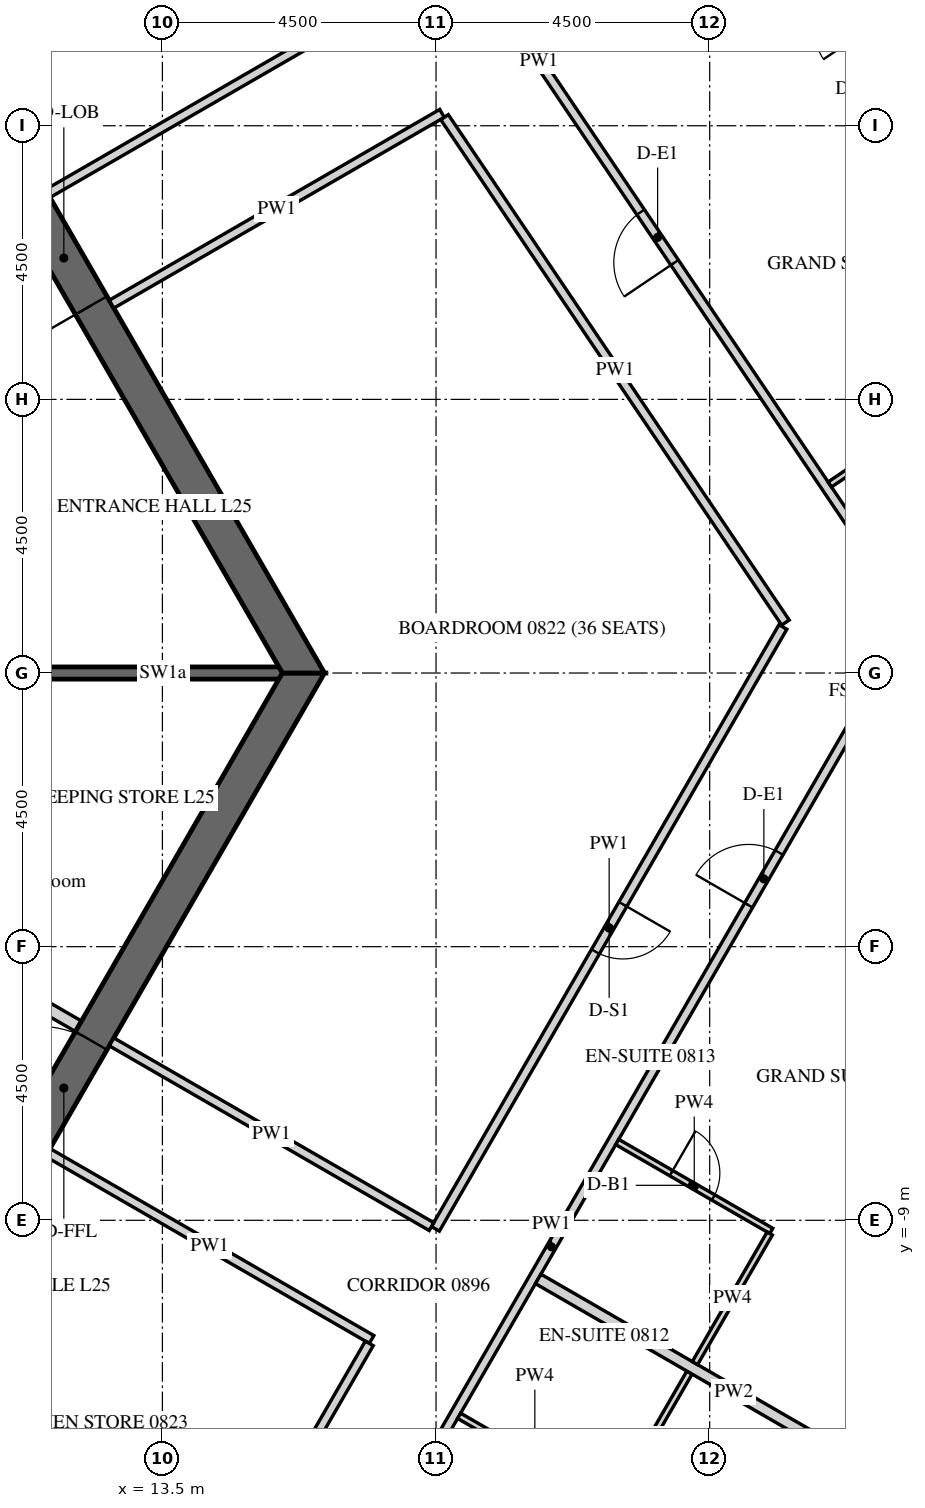
"""IFC4 building model, lengths in metres.
Left out: names, types, materials, properties, quantities, classifications, styles, units other than length and angle.
Written with IfcOpenShell. Run it as: python <this file> out.ifc"""

import sys

from ifc_helpers import new_model, si_unit, direction, frame, frame_2d, origin, place, context, subcontext, project, spatial, polyline, rectangle, outline, extrude, element, fill, save


model = new_model("IFC4")
c1 = context("Model", 3, precision=1e-05, world=origin(), true_north=direction((0.0, 1.0)))
c2 = subcontext(c1, "Body", "Model", "MODEL_VIEW")
j1 = project(units=[si_unit("LENGTHUNIT", "METRE"), si_unit("PLANEANGLEUNIT", "RADIAN")], contexts=[c1])
p1 = place(None, origin())
s1 = spatial("IfcSite", under=j1, at=p1, CompositionType="ELEMENT")
p2 = place(p1, origin())
s2 = spatial("IfcBuilding", under=s1, at=p2, CompositionType="ELEMENT")
p3 = place(p2, frame((0.0, 0.0, 111.6)))
s3 = spatial("IfcBuildingStorey", under=s2, at=p3, CompositionType="ELEMENT", Elevation=111.6)
p4 = place(p3, frame((18.83, -26.835, -0.15), z_axis=(0.0, 0.0, 1.0), x_axis=(0.500003800416, 0.866023209602, 0.0)))
e1 = element("IfcWall", 1, at=p4, inside=s3, PredefinedType="SOLIDWALL", context=c2, shape_type="SweptSolid", body=[
    extrude(outline(polyline([(-0.022, -0.275), (30.097, -0.275), (30.045, 0.275), (0.022, 0.275), (-0.022, -0.275)])), origin(), (0.0, 0.0, 1.0), 3.9),
])
p5 = place(p4, frame((1.236, 0.0, 1.05)))
e2 = element("IfcOpeningElement", 2, at=p5, cuts=e1, PredefinedType="OPENING", context=c2, shape_type="SweptSolid", body=[
    extrude(rectangle(XDim=2.4, YDim=2.4, at=frame_2d((1.2, 1.2))), frame((0.0, 0.285, 0.0), z_axis=(0.0, -1.0, 0.0), x_axis=(1.0, 0.0, 0.0)), (0.0, 0.0, 1.0), 0.57),
])
p6 = place(p4, frame((4.835, 0.0, 1.05)))
e3 = element("IfcOpeningElement", 3, at=p6, cuts=e1, PredefinedType="OPENING", context=c2, shape_type="SweptSolid", body=[
    extrude(rectangle(XDim=2.4, YDim=2.4, at=frame_2d((1.2, 1.2))), frame((0.0, 0.285, 0.0), z_axis=(0.0, -1.0, 0.0), x_axis=(1.0, 0.0, 0.0)), (0.0, 0.0, 1.0), 0.57),
])
p7 = place(p4, frame((8.436, 0.0, 1.05)))
e4 = element("IfcOpeningElement", 4, at=p7, cuts=e1, PredefinedType="OPENING", context=c2, shape_type="SweptSolid", body=[
    extrude(rectangle(XDim=2.4, YDim=2.4, at=frame_2d((1.2, 1.2))), frame((0.0, 0.285, 0.0), z_axis=(0.0, -1.0, 0.0), x_axis=(1.0, 0.0, 0.0)), (0.0, 0.0, 1.0), 0.57),
])
p8 = place(p4, frame((12.035, 0.0, 1.05)))
e5 = element("IfcOpeningElement", 5, at=p8, cuts=e1, PredefinedType="OPENING", context=c2, shape_type="SweptSolid", body=[
    extrude(rectangle(XDim=2.4, YDim=2.4, at=frame_2d((1.2, 1.2))), frame((0.0, 0.285, 0.0), z_axis=(0.0, -1.0, 0.0), x_axis=(1.0, 0.0, 0.0)), (0.0, 0.0, 1.0), 0.57),
])
p9 = place(p4, frame((15.635, 0.0, 1.05)))
e6 = element("IfcOpeningElement", 6, at=p9, cuts=e1, PredefinedType="OPENING", context=c2, shape_type="SweptSolid", body=[
    extrude(rectangle(XDim=2.4, YDim=2.4, at=frame_2d((1.2, 1.2))), frame((0.0, 0.285, 0.0), z_axis=(0.0, -1.0, 0.0), x_axis=(1.0, 0.0, 0.0)), (0.0, 0.0, 1.0), 0.57),
])
p10 = place(p4, frame((19.236, 0.0, 1.05)))
e7 = element("IfcOpeningElement", 7, at=p10, cuts=e1, PredefinedType="OPENING", context=c2, shape_type="SweptSolid", body=[
    extrude(rectangle(XDim=2.4, YDim=2.4, at=frame_2d((1.2, 1.2))), frame((0.0, 0.285, 0.0), z_axis=(0.0, -1.0, 0.0), x_axis=(1.0, 0.0, 0.0)), (0.0, 0.0, 1.0), 0.57),
])
p11 = place(p4, frame((22.835, 0.0, 1.05)))
e8 = element("IfcOpeningElement", 8, at=p11, cuts=e1, PredefinedType="OPENING", context=c2, shape_type="SweptSolid", body=[
    extrude(rectangle(XDim=2.4, YDim=2.4, at=frame_2d((1.2, 1.2))), frame((0.0, 0.285, 0.0), z_axis=(0.0, -1.0, 0.0), x_axis=(1.0, 0.0, 0.0)), (0.0, 0.0, 1.0), 0.57),
])
p12 = place(p4, frame((26.436, 0.0, 1.05)))
e9 = element("IfcOpeningElement", 9, at=p12, cuts=e1, PredefinedType="OPENING", context=c2, shape_type="SweptSolid", body=[
    extrude(rectangle(XDim=2.4, YDim=2.4, at=frame_2d((1.2, 1.2))), frame((0.0, 0.285, 0.0), z_axis=(0.0, -1.0, 0.0), x_axis=(1.0, 0.0, 0.0)), (0.0, 0.0, 1.0), 0.57),
])
p13 = place(p3, frame((33.728, 3.153, -0.15), z_axis=(0.0, 0.0, 1.0), x_axis=(-0.559192411416, 0.82903790445, 0.0)))
e10 = element("IfcWall", 10, at=p13, inside=s3, PredefinedType="SOLIDWALL", context=c2, shape_type="SweptSolid", body=[
    extrude(outline(polyline([(-0.026, -0.275), (30.093, -0.275), (30.048, 0.275), (0.026, 0.275), (-0.026, -0.275)])), origin(), (0.0, 0.0, 1.0), 3.9),
])
p14 = place(p13, frame((1.236, 0.0, 1.05)))
e11 = element("IfcOpeningElement", 11, at=p14, cuts=e10, PredefinedType="OPENING", context=c2, shape_type="SweptSolid", body=[
    extrude(rectangle(XDim=2.4, YDim=2.4, at=frame_2d((1.2, 1.2))), frame((0.0, 0.285, 0.0), z_axis=(0.0, -1.0, 0.0), x_axis=(1.0, 0.0, 0.0)), (0.0, 0.0, 1.0), 0.57),
])
p15 = place(p13, frame((4.835, 0.0, 1.05)))
e12 = element("IfcOpeningElement", 12, at=p15, cuts=e10, PredefinedType="OPENING", context=c2, shape_type="SweptSolid", body=[
    extrude(rectangle(XDim=2.4, YDim=2.4, at=frame_2d((1.2, 1.2))), frame((0.0, 0.285, 0.0), z_axis=(0.0, -1.0, 0.0), x_axis=(1.0, 0.0, 0.0)), (0.0, 0.0, 1.0), 0.57),
])
p16 = place(p13, frame((8.436, 0.0, 1.05)))
e13 = element("IfcOpeningElement", 13, at=p16, cuts=e10, PredefinedType="OPENING", context=c2, shape_type="SweptSolid", body=[
    extrude(rectangle(XDim=2.4, YDim=2.4, at=frame_2d((1.2, 1.2))), frame((0.0, 0.285, 0.0), z_axis=(0.0, -1.0, 0.0), x_axis=(1.0, 0.0, 0.0)), (0.0, 0.0, 1.0), 0.57),
])
p17 = place(p13, frame((12.035, 0.0, 1.05)))
e14 = element("IfcOpeningElement", 14, at=p17, cuts=e10, PredefinedType="OPENING", context=c2, shape_type="SweptSolid", body=[
    extrude(rectangle(XDim=2.4, YDim=2.4, at=frame_2d((1.2, 1.2))), frame((0.0, 0.285, 0.0), z_axis=(0.0, -1.0, 0.0), x_axis=(1.0, 0.0, 0.0)), (0.0, 0.0, 1.0), 0.57),
])
p18 = place(p13, frame((15.635, 0.0, 1.05)))
e15 = element("IfcOpeningElement", 15, at=p18, cuts=e10, PredefinedType="OPENING", context=c2, shape_type="SweptSolid", body=[
    extrude(rectangle(XDim=2.4, YDim=2.4, at=frame_2d((1.2, 1.2))), frame((0.0, 0.285, 0.0), z_axis=(0.0, -1.0, 0.0), x_axis=(1.0, 0.0, 0.0)), (0.0, 0.0, 1.0), 0.57),
])
p19 = place(p13, frame((19.236, 0.0, 1.05)))
e16 = element("IfcOpeningElement", 16, at=p19, cuts=e10, PredefinedType="OPENING", context=c2, shape_type="SweptSolid", body=[
    extrude(rectangle(XDim=2.4, YDim=2.4, at=frame_2d((1.2, 1.2))), frame((0.0, 0.285, 0.0), z_axis=(0.0, -1.0, 0.0), x_axis=(1.0, 0.0, 0.0)), (0.0, 0.0, 1.0), 0.57),
])
p20 = place(p13, frame((22.835, 0.0, 1.05)))
e17 = element("IfcOpeningElement", 17, at=p20, cuts=e10, PredefinedType="OPENING", context=c2, shape_type="SweptSolid", body=[
    extrude(rectangle(XDim=2.4, YDim=2.4, at=frame_2d((1.2, 1.2))), frame((0.0, 0.285, 0.0), z_axis=(0.0, -1.0, 0.0), x_axis=(1.0, 0.0, 0.0)), (0.0, 0.0, 1.0), 0.57),
])
p21 = place(p13, frame((26.436, 0.0, 1.05)))
e18 = element("IfcOpeningElement", 18, at=p21, cuts=e10, PredefinedType="OPENING", context=c2, shape_type="SweptSolid", body=[
    extrude(rectangle(XDim=2.4, YDim=2.4, at=frame_2d((1.2, 1.2))), frame((0.0, 0.285, 0.0), z_axis=(0.0, -1.0, 0.0), x_axis=(1.0, 0.0, 0.0)), (0.0, 0.0, 1.0), 0.57),
])
p22 = place(p3, frame((7.91, -13.7, -0.15), z_axis=(0.0, 0.0, 1.0), x_axis=(0.499999880136, 0.866025472988, 0.0)))
e19 = element("IfcWall", 19, at=p22, inside=s3, PredefinedType="SHEAR", context=c2, shape_type="SweptSolid", body=[
    extrude(outline(polyline([(-0.173, -0.3), (15.993, -0.3), (15.646, 0.3), (0.173, 0.3), (-0.173, -0.3)])), origin(), (0.0, 0.0, 1.0), 3.9),
])
p23 = place(p22, frame((7.039, 0.0, 0.15)))
e20 = element("IfcOpeningElement", 20, at=p23, cuts=e19, PredefinedType="OPENING", context=c2, shape_type="SweptSolid", body=[
    extrude(rectangle(XDim=1.8, YDim=2.4, at=frame_2d((0.9, 1.2))), frame((0.0, 0.31, 0.0), z_axis=(0.0, -1.0, 0.0), x_axis=(1.0, 0.0, 0.0)), (0.0, 0.0, 1.0), 0.62),
])
p24 = place(p3, frame((15.819, 0.0, -0.15), z_axis=(0.0, 0.0, 1.0), x_axis=(-0.499999880136, 0.866025472988, 0.0)))
e21 = element("IfcWall", 21, at=p24, inside=s3, PredefinedType="SHEAR", context=c2, shape_type="SweptSolid", body=[
    extrude(outline(polyline([(-0.173, -0.3), (15.993, -0.3), (15.646, 0.3), (0.173, 0.3), (-0.173, -0.3)])), origin(), (0.0, 0.0, 1.0), 3.9),
])
p25 = place(p24, frame((6.981, 0.0, 0.15)))
e22 = element("IfcOpeningElement", 22, at=p25, cuts=e21, PredefinedType="OPENING", context=c2, shape_type="SweptSolid", body=[
    extrude(rectangle(XDim=1.8, YDim=2.4, at=frame_2d((0.9, 1.2))), frame((0.0, 0.31, 0.0), z_axis=(0.0, -1.0, 0.0), x_axis=(1.0, 0.0, 0.0)), (0.0, 0.0, 1.0), 0.62),
])
p26 = place(p3, frame((11.547, 0.0, -0.15), z_axis=(0.0, 0.0, 1.0), x_axis=(1.0, 0.0, 0.0)))
e23 = element("IfcWall", 23, at=p26, inside=s3, PredefinedType="SHEAR", context=c2, shape_type="SweptSolid", body=[
    extrude(rectangle(XDim=3.926, YDim=0.2, at=frame_2d((1.963, 0.0))), origin(), (0.0, 0.0, 1.0), 3.9),
])
p27 = place(p3, frame((9.175, -4.109, 0.0), z_axis=(0.0, 0.0, 1.0), x_axis=(0.865989465428, -0.500062241894, 0.0)))
e24 = element("IfcWall", 24, at=p27, inside=s3, PredefinedType="PARTITIONING", context=c2, shape_type="SweptSolid", body=[
    extrude(rectangle(XDim=3.4, YDim=0.2, at=frame_2d((1.7, 0.0))), origin(), (0.0, 0.0, 1.0), 3.65),
])
p28 = place(p27, frame((1.351, 0.0, 0.0)))
e25 = element("IfcOpeningElement", 25, at=p28, cuts=e24, PredefinedType="OPENING", context=c2, shape_type="SweptSolid", body=[
    extrude(rectangle(XDim=0.9, YDim=2.1, at=frame_2d((0.45, 1.05))), frame((0.0, 0.11, 0.0), z_axis=(0.0, -1.0, 0.0), x_axis=(1.0, 0.0, 0.0)), (0.0, 0.0, 1.0), 0.22),
])
p29 = place(p3, frame((13.928, -19.775, 0.0), z_axis=(0.0, 0.0, 1.0), x_axis=(0.50000450071, 0.866022805283, 0.0)))
e26 = element("IfcWall", 26, at=p29, inside=s3, PredefinedType="PARTITIONING", context=c2, shape_type="SweptSolid", body=[
    extrude(rectangle(XDim=23.877, YDim=0.15, at=frame_2d((11.938, 0.0))), origin(), (0.0, 0.0, 1.0), 2.988),
])
p30 = place(p29, frame((3.843, 0.0, 0.0)))
e27 = element("IfcOpeningElement", 27, at=p30, cuts=e26, PredefinedType="OPENING", context=c2, shape_type="SweptSolid", body=[
    extrude(rectangle(XDim=1.0, YDim=2.1, at=frame_2d((0.5, 1.05))), frame((0.0, 0.085, 0.0), z_axis=(0.0, -1.0, 0.0), x_axis=(1.0, 0.0, 0.0)), (0.0, 0.0, 1.0), 0.17),
])
p31 = place(p29, frame((18.425, 0.0, 0.0)))
e28 = element("IfcOpeningElement", 28, at=p31, cuts=e26, PredefinedType="OPENING", context=c2, shape_type="SweptSolid", body=[
    extrude(rectangle(XDim=1.0, YDim=2.1, at=frame_2d((0.5, 1.05))), frame((0.0, 0.085, 0.0), z_axis=(0.0, -1.0, 0.0), x_axis=(1.0, 0.0, 0.0)), (0.0, 0.0, 1.0), 0.17),
])
p32 = place(p3, frame((25.821, 0.972, 0.0), z_axis=(0.0, 0.0, 1.0), x_axis=(-0.559192946342, 0.829037543638, 0.0)))
e29 = element("IfcWall", 29, at=p32, inside=s3, PredefinedType="PARTITIONING", context=c2, shape_type="SweptSolid", body=[
    extrude(rectangle(XDim=21.918, YDim=0.15, at=frame_2d((10.959, 0.0))), origin(), (0.0, 0.0, 1.0), 2.988),
])
p33 = place(p32, frame((6.969, 0.0, 0.0)))
e30 = element("IfcOpeningElement", 30, at=p33, cuts=e29, PredefinedType="OPENING", context=c2, shape_type="SweptSolid", body=[
    extrude(rectangle(XDim=1.0, YDim=2.1, at=frame_2d((0.5, 1.05))), frame((0.0, 0.085, 0.0), z_axis=(0.0, -1.0, 0.0), x_axis=(1.0, 0.0, 0.0)), (0.0, 0.0, 1.0), 0.17),
])
p34 = place(p32, frame((15.511, 0.0, 0.0)))
e31 = element("IfcOpeningElement", 31, at=p34, cuts=e29, PredefinedType="OPENING", context=c2, shape_type="SweptSolid", body=[
    extrude(rectangle(XDim=1.0, YDim=2.1, at=frame_2d((0.5, 1.05))), frame((0.0, 0.085, 0.0), z_axis=(0.0, -1.0, 0.0), x_axis=(1.0, 0.0, 0.0)), (0.0, 0.0, 1.0), 0.17),
])
p35 = place(p3, frame((12.664, 6.066, 0.0), z_axis=(0.0, 0.0, 1.0), x_axis=(0.866036561919, 0.499980673046, 0.0)))
e32 = element("IfcWall", 32, at=p35, inside=s3, PredefinedType="PARTITIONING", context=c2, shape_type="SweptSolid", body=[
    extrude(rectangle(XDim=6.275, YDim=0.15, at=frame_2d((3.137, 0.0))), origin(), (0.0, 0.0, 1.0), 2.988),
])
p36 = place(p3, frame((18.14, 9.141, 0.0), z_axis=(0.0, 0.0, 1.0), x_axis=(0.55918799196, -0.829040885389, 0.0)))
e33 = element("IfcWall", 33, at=p36, inside=s3, PredefinedType="PARTITIONING", context=c2, shape_type="SweptSolid", body=[
    extrude(rectangle(XDim=10.025, YDim=0.15, at=frame_2d((5.013, 0.0))), origin(), (0.0, 0.0, 1.0), 2.988),
])
p37 = place(p3, frame((23.704, 0.757, 0.0), z_axis=(0.0, 0.0, 1.0), x_axis=(-0.500010297365, -0.866019458516, 0.0)))
e34 = element("IfcWall", 34, at=p37, inside=s3, PredefinedType="PARTITIONING", context=c2, shape_type="SweptSolid", body=[
    extrude(rectangle(XDim=11.429, YDim=0.15, at=frame_2d((5.714, 0.0))), origin(), (0.0, 0.0, 1.0), 2.988),
])
p38 = place(p37, frame((5.264, 0.0, 0.0)))
e35 = element("IfcOpeningElement", 35, at=p38, cuts=e34, PredefinedType="OPENING", context=c2, shape_type="SweptSolid", body=[
    extrude(rectangle(XDim=0.9, YDim=2.1, at=frame_2d((0.45, 1.05))), frame((0.0, 0.085, 0.0), z_axis=(0.0, -1.0, 0.0), x_axis=(1.0, 0.0, 0.0)), (0.0, 0.0, 1.0), 0.17),
])
p39 = place(p3, frame((17.925, -9.103, 0.0), z_axis=(0.0, 0.0, 1.0), x_axis=(-0.866013586754, 0.500020467139, 0.0)))
e36 = element("IfcWall", 36, at=p39, inside=s3, PredefinedType="PARTITIONING", context=c2, shape_type="SweptSolid", body=[
    extrude(rectangle(XDim=6.075, YDim=0.15, at=frame_2d((3.038, 0.0))), origin(), (0.0, 0.0, 1.0), 2.988),
])
p40 = place(p3, frame((11.614, -7.884, 0.0), z_axis=(0.0, 0.0, 1.0), x_axis=(0.866033542371, -0.499985903289, 0.0)))
e37 = element("IfcWall", 37, at=p40, inside=s3, PredefinedType="PARTITIONING", context=c2, shape_type="SweptSolid", body=[
    extrude(rectangle(XDim=6.15, YDim=0.15, at=frame_2d((3.075, 0.0))), origin(), (0.0, 0.0, 1.0), 2.988),
])
p41 = place(p3, frame((16.902, -11.024, 0.0), z_axis=(0.0, 0.0, 1.0), x_axis=(-0.499999527968, -0.866025676312, 0.0)))
e38 = element("IfcWall", 38, at=p41, inside=s3, PredefinedType="PARTITIONING", context=c2, shape_type="SweptSolid", body=[
    extrude(rectangle(XDim=8.441, YDim=0.15, at=frame_2d((4.22, 0.0))), origin(), (0.0, 0.0, 1.0), 2.988),
])
p42 = place(p41, frame((3.771, 0.0, 0.0)))
e39 = element("IfcOpeningElement", 39, at=p42, cuts=e38, PredefinedType="OPENING", context=c2, shape_type="SweptSolid", body=[
    extrude(rectangle(XDim=0.9, YDim=2.1, at=frame_2d((0.45, 1.05))), frame((0.0, 0.085, 0.0), z_axis=(0.0, -1.0, 0.0), x_axis=(1.0, 0.0, 0.0)), (0.0, 0.0, 1.0), 0.17),
])
p43 = place(p3, frame((16.855, 10.911, 0.0), z_axis=(0.0, 0.0, 1.0), x_axis=(-0.866020343444, -0.500008764664, 0.0)))
e40 = element("IfcWall", 40, at=p43, inside=s3, PredefinedType="PARTITIONING", context=c2, shape_type="SweptSolid", body=[
    extrude(rectangle(XDim=6.053, YDim=0.15, at=frame_2d((3.026, 0.0))), origin(), (0.0, 0.0, 1.0), 2.988),
])
p44 = place(p3, frame((22.168, -11.504, 0.0), z_axis=(0.0, 0.0, 1.0), x_axis=(-0.50001992892, -0.866013897511, 0.0)))
e41 = element("IfcWall", 41, at=p44, inside=s3, PredefinedType="PARTITIONING", context=c2, shape_type="SweptSolid", body=[
    extrude(rectangle(XDim=2.51, YDim=0.1, at=frame_2d((1.255, 0.0))), origin(), (0.0, 0.0, 1.0), 2.988),
])
p45 = place(p3, frame((20.87, -13.653, 0.0), z_axis=(0.0, 0.0, 1.0), x_axis=(-0.866039941686, 0.499974818771, 0.0)))
e42 = element("IfcWall", 42, at=p45, inside=s3, PredefinedType="PARTITIONING", context=c2, shape_type="SweptSolid", body=[
    extrude(rectangle(XDim=2.875, YDim=0.1, at=frame_2d((1.438, 0.0))), origin(), (0.0, 0.0, 1.0), 2.988),
])
p46 = place(p45, frame((1.05, 0.0, 0.0)))
e43 = element("IfcOpeningElement", 43, at=p46, cuts=e42, PredefinedType="OPENING", context=c2, shape_type="SweptSolid", body=[
    extrude(rectangle(XDim=0.8, YDim=2.1, at=frame_2d((0.4, 1.05))), frame((0.0, 0.06, 0.0), z_axis=(0.0, -1.0, 0.0), x_axis=(1.0, 0.0, 0.0)), (0.0, 0.0, 1.0), 0.12),
])
p47 = place(p3, frame((26.11, -13.676, 0.0), z_axis=(0.0, 0.0, 1.0), x_axis=(-0.866014745021, 0.500018461065, 0.0)))
e44 = element("IfcWall", 44, at=p47, inside=s3, PredefinedType="PARTITIONING", context=c2, shape_type="SweptSolid", body=[
    extrude(rectangle(XDim=7.425, YDim=0.18, at=frame_2d((3.712, 0.0))), origin(), (0.0, 0.0, 1.0), 2.988),
])
p48 = place(p3, frame((20.98, -7.712, 0.0), z_axis=(0.0, 0.0, 1.0), x_axis=(0.86601045545, -0.500025890382, 0.0)))
e45 = element("IfcWall", 45, at=p48, inside=s3, PredefinedType="PARTITIONING", context=c2, shape_type="SweptSolid", body=[
    extrude(rectangle(XDim=2.925, YDim=0.1, at=frame_2d((1.462, 0.0))), origin(), (0.0, 0.0, 1.0), 2.988),
])
p49 = place(p48, frame((1.025, 0.0, 0.0)))
e46 = element("IfcOpeningElement", 46, at=p49, cuts=e45, PredefinedType="OPENING", context=c2, shape_type="SweptSolid", body=[
    extrude(rectangle(XDim=0.8, YDim=2.1, at=frame_2d((0.4, 1.05))), frame((0.0, 0.06, 0.0), z_axis=(0.0, -1.0, 0.0), x_axis=(1.0, 0.0, 0.0)), (0.0, 0.0, 1.0), 0.12),
])
p50 = place(p3, frame((23.488, -9.218, 0.0), z_axis=(0.0, 0.0, 1.0), x_axis=(-0.500003092839, -0.866023618125, 0.0)))
e47 = element("IfcWall", 47, at=p50, inside=s3, PredefinedType="PARTITIONING", context=c2, shape_type="SweptSolid", body=[
    extrude(rectangle(XDim=2.46, YDim=0.1, at=frame_2d((1.23, 0.0))), origin(), (0.0, 0.0, 1.0), 2.988),
])
p51 = place(p3, frame((24.476, 3.101, 0.0), z_axis=(0.0, 0.0, 1.0), x_axis=(0.829047014003, 0.559178905694, 0.0)))
e48 = element("IfcWall", 48, at=p51, inside=s3, PredefinedType="PARTITIONING", context=c2, shape_type="SweptSolid", body=[
    extrude(rectangle(XDim=2.725, YDim=0.1, at=frame_2d((1.362, 0.0))), origin(), (0.0, 0.0, 1.0), 2.988),
])
p52 = place(p51, frame((0.925, 0.0, 0.0)))
e49 = element("IfcOpeningElement", 49, at=p52, cuts=e48, PredefinedType="OPENING", context=c2, shape_type="SweptSolid", body=[
    extrude(rectangle(XDim=0.8, YDim=2.1, at=frame_2d((0.4, 1.05))), frame((0.0, 0.06, 0.0), z_axis=(0.0, -1.0, 0.0), x_axis=(1.0, 0.0, 0.0)), (0.0, 0.0, 1.0), 0.12),
])
p53 = place(p3, frame((26.852, 8.027, 0.0), z_axis=(0.0, 0.0, 1.0), x_axis=(-0.559216845309, 0.829021423078, 0.0)))
e50 = element("IfcWall", 50, at=p53, inside=s3, PredefinedType="PARTITIONING", context=c2, shape_type="SweptSolid", body=[
    extrude(rectangle(XDim=7.06, YDim=0.1, at=frame_2d((3.53, 0.0))), origin(), (0.0, 0.0, 1.0), 2.988),
])
p54 = place(p53, frame((3.1, 0.0, 0.0)))
e51 = element("IfcOpeningElement", 51, at=p54, cuts=e50, PredefinedType="OPENING", context=c2, shape_type="SweptSolid", body=[
    extrude(rectangle(XDim=0.9, YDim=2.1, at=frame_2d((0.45, 1.05))), frame((0.0, 0.06, 0.0), z_axis=(0.0, -1.0, 0.0), x_axis=(1.0, 0.0, 0.0)), (0.0, 0.0, 1.0), 0.12),
])
p55 = place(p25, origin())
e52 = element("IfcDoor", 52, at=p55, inside=s3, OperationType="DOUBLE_DOOR_SINGLE_SWING", PredefinedType="DOOR", context=c2, shape_type="SweptSolid", body=[
    extrude(rectangle(XDim=1.8, YDim=2.4, at=frame_2d((0.9, 1.2))), frame((0.0, 0.025, 0.0), z_axis=(0.0, -1.0, 0.0), x_axis=(1.0, 0.0, 0.0)), (0.0, 0.0, 1.0), 0.05),
])
fill(e22, e52)
p56 = place(p23, origin())
e53 = element("IfcDoor", 53, at=p56, inside=s3, OperationType="DOUBLE_DOOR_SINGLE_SWING", PredefinedType="DOOR", context=c2, shape_type="SweptSolid", body=[
    extrude(rectangle(XDim=1.8, YDim=2.4, at=frame_2d((0.9, 1.2))), frame((0.0, 0.025, 0.0), z_axis=(0.0, -1.0, 0.0), x_axis=(1.0, 0.0, 0.0)), (0.0, 0.0, 1.0), 0.05),
])
fill(e20, e53)
p57 = place(p31, origin())
e54 = element("IfcDoor", 54, at=p57, inside=s3, OperationType="SINGLE_SWING_RIGHT", PredefinedType="DOOR", context=c2, shape_type="SweptSolid", body=[
    extrude(rectangle(XDim=1.0, YDim=2.1, at=frame_2d((0.5, 1.05))), frame((0.0, 0.025, 0.0), z_axis=(0.0, -1.0, 0.0), x_axis=(1.0, 0.0, 0.0)), (0.0, 0.0, 1.0), 0.05),
])
fill(e28, e54)
p58 = place(p49, origin())
e55 = element("IfcDoor", 55, at=p58, inside=s3, OperationType="SINGLE_SWING_RIGHT", PredefinedType="DOOR", context=c2, shape_type="SweptSolid", body=[
    extrude(rectangle(XDim=0.8, YDim=2.1, at=frame_2d((0.4, 1.05))), frame((0.0, 0.025, 0.0), z_axis=(0.0, -1.0, 0.0), x_axis=(1.0, 0.0, 0.0)), (0.0, 0.0, 1.0), 0.05),
])
fill(e46, e55)
p59 = place(p33, origin())
e56 = element("IfcDoor", 56, at=p59, inside=s3, OperationType="SINGLE_SWING_RIGHT", PredefinedType="DOOR", context=c2, shape_type="SweptSolid", body=[
    extrude(rectangle(XDim=1.0, YDim=2.1, at=frame_2d((0.5, 1.05))), frame((0.0, 0.025, 0.0), z_axis=(0.0, -1.0, 0.0), x_axis=(1.0, 0.0, 0.0)), (0.0, 0.0, 1.0), 0.05),
])
fill(e30, e56)
p60 = place(p38, origin())
e57 = element("IfcDoor", 57, at=p60, inside=s3, OperationType="SINGLE_SWING_LEFT", PredefinedType="DOOR", context=c2, shape_type="SweptSolid", body=[
    extrude(rectangle(XDim=0.9, YDim=2.1, at=frame_2d((0.45, 1.05))), frame((0.0, 0.025, 0.0), z_axis=(0.0, -1.0, 0.0), x_axis=(1.0, 0.0, 0.0)), (0.0, 0.0, 1.0), 0.05),
])
fill(e35, e57)
save(model, sys.argv[1])
